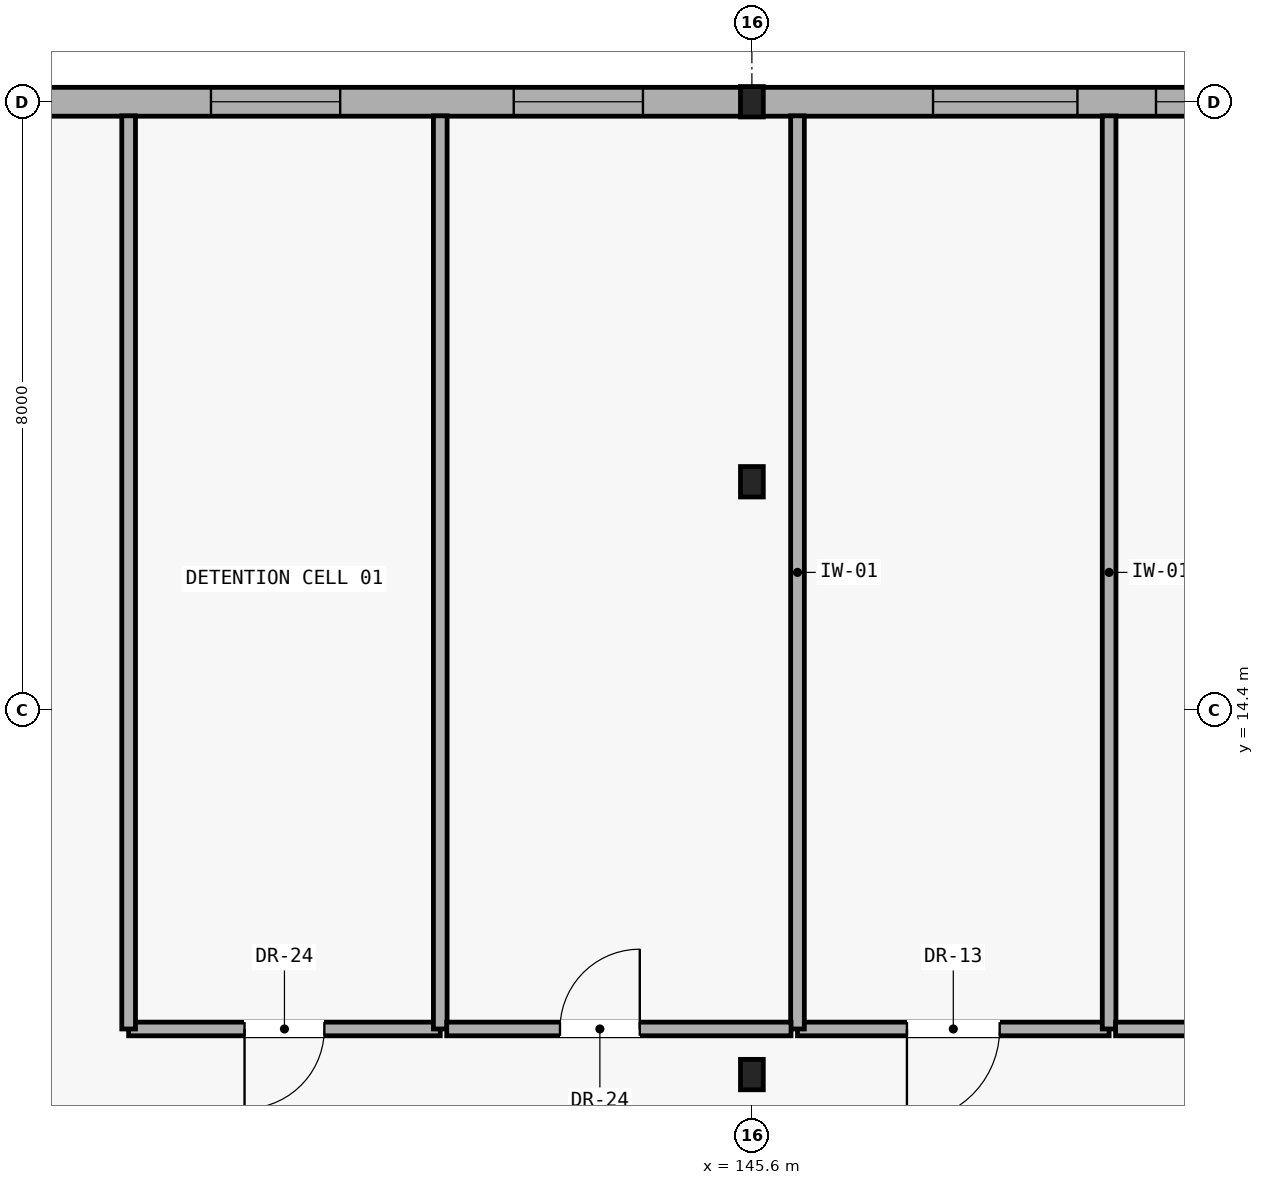
"""IFC4 building model, lengths in metres.
Left out: names, types, materials, properties, quantities, classifications, styles, units other than length and angle.
Written with IfcOpenShell. Run it as: python <this file> out.ifc"""

import sys

from ifc_helpers import new_model, si_unit, direction, frame, frame_2d, origin, origin_2d, place, context, subcontext, project, spatial, rectangle, i_section, extrude, element, fill, save


model = new_model("IFC4")
c1 = context("Model", 3, precision=1e-05, world=origin(), true_north=direction((0.0, 1.0)))
c2 = subcontext(c1, "Body", "Model", "MODEL_VIEW")
j1 = project(units=[si_unit("LENGTHUNIT", "METRE"), si_unit("PLANEANGLEUNIT", "RADIAN")], contexts=[c1])
p1 = place(None, origin())
s1 = spatial("IfcSite", under=j1, at=p1, CompositionType="ELEMENT")
p2 = place(p1, origin())
s2 = spatial("IfcBuilding", under=s1, at=p2, CompositionType="ELEMENT")
p3 = place(p2, origin())
s3 = spatial("IfcBuildingStorey", under=s2, at=p3, CompositionType="ELEMENT", Elevation=0.0)
for number, where, z_axis, x_axis in (
    (1, (145.6, 22.4, -0.27), (0.0, 0.0, 1.0), (1.0, 0.0, 0.0)),
    (2, (145.6, 9.6, -0.27), (0.0, 0.0, 1.0), (1.0, 0.0, 0.0)),
    (3, (145.6, 17.4, -0.27), (0.0, 0.0, 1.0), (1.0, 0.0, 0.0)),
):
    element("IfcColumn", number, at=place(p3, frame(where, z_axis=z_axis, x_axis=x_axis)), inside=s3, PredefinedType="COLUMN", context=c2, shape_type="SweptSolid", body=[
        extrude(i_section(OverallWidth=0.3, OverallDepth=0.4, WebThickness=0.013, FlangeThickness=0.024, FilletRadius=0.027, at=origin_2d()), origin(), (0.0, 0.0, 1.0), 5.52),
    ])
p4 = place(p3, frame((136.009, 22.4, 0.0), z_axis=(0.0, 0.0, 1.0), x_axis=(1.0, 0.0, 0.0)))
e4 = element("IfcWall", 4, at=p4, inside=s3, PredefinedType="SOLIDWALL", context=c2, shape_type="SweptSolid", body=[
    extrude(rectangle(XDim=9.583, YDim=0.38, at=frame_2d((4.791, 0.0))), origin(), (0.0, 0.0, 1.0), 4.67),
])
p5 = place(p4, frame((2.475, 0.0, 1.7)))
e5 = element("IfcOpeningElement", 5, at=p5, cuts=e4, PredefinedType="OPENING", context=c2, shape_type="SweptSolid", body=[
    extrude(rectangle(XDim=1.7, YDim=0.7, at=frame_2d((0.85, 0.35))), frame((0.0, 0.2, 0.0), z_axis=(0.0, -1.0, 0.0), x_axis=(1.0, 0.0, 0.0)), (0.0, 0.0, 1.0), 0.4),
])
p6 = place(p4, frame((6.458, 0.0, 1.7)))
e6 = element("IfcOpeningElement", 6, at=p6, cuts=e4, PredefinedType="OPENING", context=c2, shape_type="SweptSolid", body=[
    extrude(rectangle(XDim=1.7, YDim=0.7, at=frame_2d((0.85, 0.35))), frame((0.0, 0.2, 0.0), z_axis=(0.0, -1.0, 0.0), x_axis=(1.0, 0.0, 0.0)), (0.0, 0.0, 1.0), 0.4),
])
p7 = place(p3, frame((145.609, 22.4, 0.0), z_axis=(0.0, 0.0, 1.0), x_axis=(1.0, 0.0, 0.0)))
e7 = element("IfcWall", 7, at=p7, inside=s3, PredefinedType="SOLIDWALL", context=c2, shape_type="SweptSolid", body=[
    extrude(rectangle(XDim=9.583, YDim=0.38, at=frame_2d((4.791, 0.0))), origin(), (0.0, 0.0, 1.0), 4.67),
])
p8 = place(p7, frame((2.375, 0.0, 1.7)))
e8 = element("IfcOpeningElement", 8, at=p8, cuts=e7, PredefinedType="OPENING", context=c2, shape_type="SweptSolid", body=[
    extrude(rectangle(XDim=1.9, YDim=0.7, at=frame_2d((0.95, 0.35))), frame((0.0, 0.2, 0.0), z_axis=(0.0, -1.0, 0.0), x_axis=(1.0, 0.0, 0.0)), (0.0, 0.0, 1.0), 0.4),
])
p9 = place(p7, frame((5.308, 0.0, 1.7)))
e9 = element("IfcOpeningElement", 9, at=p9, cuts=e7, PredefinedType="OPENING", context=c2, shape_type="SweptSolid", body=[
    extrude(rectangle(XDim=1.9, YDim=0.7, at=frame_2d((0.95, 0.35))), frame((0.0, 0.2, 0.0), z_axis=(0.0, -1.0, 0.0), x_axis=(1.0, 0.0, 0.0)), (0.0, 0.0, 1.0), 0.4),
])
p10 = place(p3, frame((146.2, 10.2, 0.0), z_axis=(0.0, 0.0, 1.0), x_axis=(1.0, 0.0, 0.0)))
e10 = element("IfcWall", 10, at=p10, inside=s3, PredefinedType="PARTITIONING", context=c2, shape_type="SweptSolid", body=[
    extrude(rectangle(XDim=4.1, YDim=0.18, at=frame_2d((2.05, 0.0))), origin(), (0.0, 0.0, 1.0), 5.0),
])
p11 = place(p10, frame((1.44, 0.0, 0.0)))
e11 = element("IfcOpeningElement", 11, at=p11, cuts=e10, PredefinedType="OPENING", context=c2, shape_type="SweptSolid", body=[
    extrude(rectangle(XDim=1.22, YDim=2.1, at=frame_2d((0.61, 1.05))), frame((0.0, 0.1, 0.0), z_axis=(0.0, -1.0, 0.0), x_axis=(1.0, 0.0, 0.0)), (0.0, 0.0, 1.0), 0.2),
])
for number, where, z_axis, x_axis in (
    (12, (150.3, 10.2, 0.0), (0.0, 0.0, 1.0), (0.0, 1.0, 0.0)),
    (13, (146.2, 22.215, 0.0), (0.0, 0.0, 1.0), (0.0, -1.0, 0.0)),
):
    element("IfcWall", number, at=place(p3, frame(where, z_axis=z_axis, x_axis=x_axis)), inside=s3, PredefinedType="PARTITIONING", context=c2, shape_type="SweptSolid", body=[
        extrude(rectangle(XDim=12.015, YDim=0.18, at=frame_2d((6.008, 0.0))), origin(), (0.0, 0.0, 1.0), 5.0),
    ])
p12 = place(p3, frame((150.385, 10.2, 0.0), z_axis=(0.0, 0.0, 1.0), x_axis=(1.0, 0.0, 0.0)))
e14 = element("IfcWall", 14, at=p12, inside=s3, PredefinedType="PARTITIONING", context=c2, shape_type="SweptSolid", body=[
    extrude(rectangle(XDim=4.415, YDim=0.18, at=frame_2d((2.208, 0.0))), origin(), (0.0, 0.0, 1.0), 5.0),
])
p13 = place(p12, frame((1.597, 0.0, 0.0)))
e15 = element("IfcOpeningElement", 15, at=p13, cuts=e14, PredefinedType="OPENING", context=c2, shape_type="SweptSolid", body=[
    extrude(rectangle(XDim=1.22, YDim=2.1, at=frame_2d((0.61, 1.05))), frame((0.0, 0.1, 0.0), z_axis=(0.0, -1.0, 0.0), x_axis=(1.0, 0.0, 0.0)), (0.0, 0.0, 1.0), 0.2),
])
p14 = place(p3, frame((137.4, 10.2, 0.0), z_axis=(0.0, 0.0, 1.0), x_axis=(1.0, 0.0, 0.0)))
e16 = element("IfcWall", 16, at=p14, inside=s3, PredefinedType="PARTITIONING", context=c2, shape_type="SweptSolid", body=[
    extrude(rectangle(XDim=4.1, YDim=0.18, at=frame_2d((2.05, 0.0))), origin(), (0.0, 0.0, 1.0), 5.0),
])
p15 = place(p14, frame((1.525, 0.0, 0.0)))
e17 = element("IfcOpeningElement", 17, at=p15, cuts=e16, PredefinedType="OPENING", context=c2, shape_type="SweptSolid", body=[
    extrude(rectangle(XDim=1.05, YDim=2.1, at=frame_2d((0.525, 1.05))), frame((0.0, 0.1, 0.0), z_axis=(0.0, -1.0, 0.0), x_axis=(1.0, 0.0, 0.0)), (0.0, 0.0, 1.0), 0.2),
])
for number, where, z_axis, x_axis in (
    (18, (141.5, 10.2, 0.0), (0.0, 0.0, 1.0), (0.0, 1.0, 0.0)),
    (19, (137.4, 22.215, 0.0), (0.0, 0.0, 1.0), (0.0, -1.0, 0.0)),
):
    element("IfcWall", number, at=place(p3, frame(where, z_axis=z_axis, x_axis=x_axis)), inside=s3, PredefinedType="PARTITIONING", context=c2, shape_type="SweptSolid", body=[
        extrude(rectangle(XDim=12.015, YDim=0.18, at=frame_2d((6.008, 0.0))), origin(), (0.0, 0.0, 1.0), 5.0),
    ])
p16 = place(p3, frame((141.585, 10.2, 0.0), z_axis=(0.0, 0.0, 1.0), x_axis=(1.0, 0.0, 0.0)))
e20 = element("IfcWall", 20, at=p16, inside=s3, PredefinedType="PARTITIONING", context=c2, shape_type="SweptSolid", body=[
    extrude(rectangle(XDim=4.53, YDim=0.18, at=frame_2d((2.265, 0.0))), origin(), (0.0, 0.0, 1.0), 5.0),
])
p17 = place(p16, frame((1.49, 0.0, 0.0)))
e21 = element("IfcOpeningElement", 21, at=p17, cuts=e20, PredefinedType="OPENING", context=c2, shape_type="SweptSolid", body=[
    extrude(rectangle(XDim=1.05, YDim=2.1, at=frame_2d((0.525, 1.05))), frame((0.0, 0.1, 0.0), z_axis=(0.0, -1.0, 0.0), x_axis=(1.0, 0.0, 0.0)), (0.0, 0.0, 1.0), 0.2),
])
p18 = place(p5, origin())
e22 = element("IfcWindow", 22, at=p18, inside=s3, PartitioningType="SINGLE_PANEL", PredefinedType="WINDOW", context=c2, shape_type="SweptSolid", body=[
    extrude(rectangle(XDim=1.7, YDim=0.7, at=frame_2d((0.85, 0.35))), frame((0.0, 0.03, 0.0), z_axis=(0.0, -1.0, 0.0), x_axis=(1.0, 0.0, 0.0)), (0.0, 0.0, 1.0), 0.06),
])
fill(e5, e22)
p19 = place(p6, origin())
e23 = element("IfcWindow", 23, at=p19, inside=s3, PartitioningType="SINGLE_PANEL", PredefinedType="WINDOW", context=c2, shape_type="SweptSolid", body=[
    extrude(rectangle(XDim=1.7, YDim=0.7, at=frame_2d((0.85, 0.35))), frame((0.0, 0.03, 0.0), z_axis=(0.0, -1.0, 0.0), x_axis=(1.0, 0.0, 0.0)), (0.0, 0.0, 1.0), 0.06),
])
fill(e6, e23)
p20 = place(p8, origin())
e24 = element("IfcWindow", 24, at=p20, inside=s3, PartitioningType="SINGLE_PANEL", PredefinedType="WINDOW", context=c2, shape_type="SweptSolid", body=[
    extrude(rectangle(XDim=1.9, YDim=0.7, at=frame_2d((0.95, 0.35))), frame((0.0, 0.03, 0.0), z_axis=(0.0, -1.0, 0.0), x_axis=(1.0, 0.0, 0.0)), (0.0, 0.0, 1.0), 0.06),
])
fill(e8, e24)
p21 = place(p9, origin())
e25 = element("IfcWindow", 25, at=p21, inside=s3, PartitioningType="SINGLE_PANEL", PredefinedType="WINDOW", context=c2, shape_type="SweptSolid", body=[
    extrude(rectangle(XDim=1.9, YDim=0.7, at=frame_2d((0.95, 0.35))), frame((0.0, 0.03, 0.0), z_axis=(0.0, -1.0, 0.0), x_axis=(1.0, 0.0, 0.0)), (0.0, 0.0, 1.0), 0.06),
])
fill(e9, e25)
p22 = place(p11, frame((1.22, 0.0, 0.0), z_axis=(0.0, 0.0, 1.0), x_axis=(-1.0, 0.0, 0.0)))
e26 = element("IfcDoor", 26, at=p22, inside=s3, OperationType="SINGLE_SWING_LEFT", PredefinedType="DOOR", context=c2, shape_type="SweptSolid", body=[
    extrude(rectangle(XDim=1.22, YDim=2.1, at=frame_2d((0.61, 1.05))), frame((0.0, 0.025, 0.0), z_axis=(0.0, -1.0, 0.0), x_axis=(1.0, 0.0, 0.0)), (0.0, 0.0, 1.0), 0.05),
])
fill(e11, e26)
p23 = place(p15, frame((1.05, 0.0, 0.0), z_axis=(0.0, 0.0, 1.0), x_axis=(-1.0, 0.0, 0.0)))
e27 = element("IfcDoor", 27, at=p23, inside=s3, OperationType="SINGLE_SWING_LEFT", PredefinedType="DOOR", context=c2, shape_type="SweptSolid", body=[
    extrude(rectangle(XDim=1.05, YDim=2.1, at=frame_2d((0.525, 1.05))), frame((0.0, 0.025, 0.0), z_axis=(0.0, -1.0, 0.0), x_axis=(1.0, 0.0, 0.0)), (0.0, 0.0, 1.0), 0.05),
])
fill(e17, e27)
p24 = place(p17, origin())
e28 = element("IfcDoor", 28, at=p24, inside=s3, OperationType="SINGLE_SWING_RIGHT", PredefinedType="DOOR", context=c2, shape_type="SweptSolid", body=[
    extrude(rectangle(XDim=1.05, YDim=2.1, at=frame_2d((0.525, 1.05))), frame((0.0, 0.025, 0.0), z_axis=(0.0, -1.0, 0.0), x_axis=(1.0, 0.0, 0.0)), (0.0, 0.0, 1.0), 0.05),
])
fill(e21, e28)
save(model, sys.argv[1])
